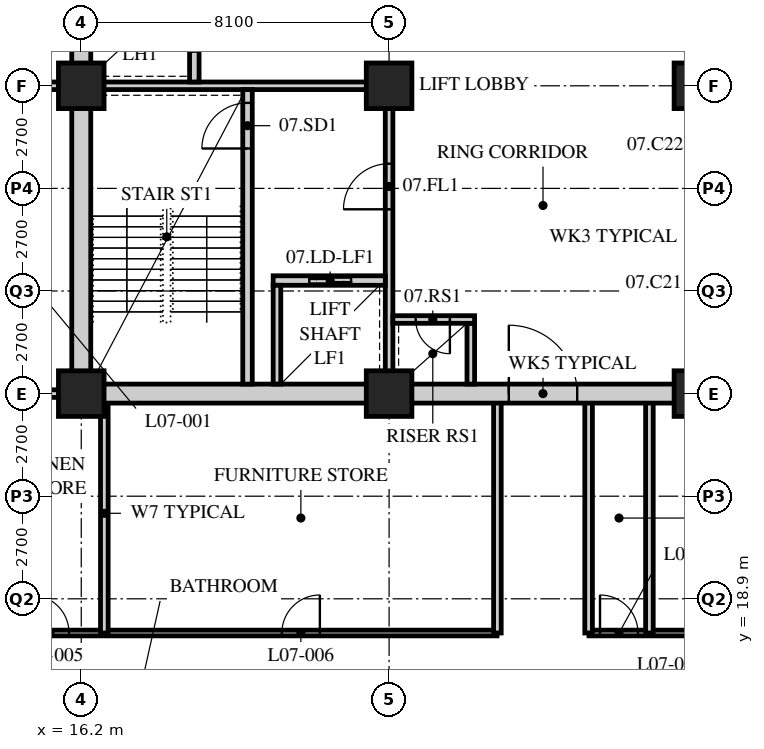
"""IFC4 building model, lengths in metres.
Left out: names, types, materials, properties, quantities, classifications, styles, units other than length and angle.
Written with IfcOpenShell. Run it as: python <this file> out.ifc"""

import sys

from ifc_helpers import new_model, si_unit, direction, frame, frame_2d, origin, origin_2d, place, context, subcontext, project, spatial, rectangle, hollow_rectangle, extrude, element, fill, save


model = new_model("IFC4")
c1 = context("Model", 3, precision=1e-05, world=origin(), true_north=direction((0.0, 1.0)))
c2 = subcontext(c1, "Body", "Model", "MODEL_VIEW")
j1 = project(units=[si_unit("LENGTHUNIT", "METRE"), si_unit("PLANEANGLEUNIT", "RADIAN")], contexts=[c1])
p1 = place(None, origin())
s1 = spatial("IfcSite", under=j1, at=p1, CompositionType="ELEMENT")
p2 = place(p1, origin())
s2 = spatial("IfcBuilding", under=s1, at=p2, CompositionType="ELEMENT")
p3 = place(p2, frame((0.0, 0.0, 36.4)))
s3 = spatial("IfcBuildingStorey", under=s2, at=p3, CompositionType="ELEMENT", Elevation=36.4)
for number, where, z_axis, x_axis in (
    (1, (16.2, 24.3, 0.0), (0.0, 0.0, 1.0), (1.0, 0.0, 0.0)),
    (2, (16.2, 32.4, 0.0), (0.0, 0.0, 1.0), (1.0, 0.0, 0.0)),
    (3, (24.3, 24.3, 0.0), (0.0, 0.0, 1.0), (1.0, 0.0, 0.0)),
    (4, (24.3, 32.4, 0.0), (0.0, 0.0, 1.0), (1.0, 0.0, 0.0)),
    (5, (32.4, 24.3, 0.0), (0.0, 0.0, 1.0), (1.0, 0.0, 0.0)),
    (6, (32.4, 32.4, 0.0), (0.0, 0.0, 1.0), (1.0, 0.0, 0.0)),
):
    element("IfcColumn", number, at=place(p3, frame(where, z_axis=z_axis, x_axis=x_axis)), inside=s3, PredefinedType="COLUMN", context=c2, shape_type="SweptSolid", body=[
        extrude(hollow_rectangle(XDim=1.2, YDim=1.2, WallThickness=0.12, at=origin_2d()), origin(), (0.0, 0.0, 1.0), 3.4),
    ])
p4 = place(p3, frame((13.95, 18.0, 0.0), z_axis=(0.0, 0.0, 1.0), x_axis=(1.0, 0.0, 0.0)))
e7 = element("IfcWall", 7, at=p4, inside=s3, PredefinedType="PARTITIONING", context=c2, shape_type="SweptSolid", body=[
    extrude(rectangle(XDim=13.19, YDim=0.15, at=frame_2d((6.595, 0.0))), origin(), (0.0, 0.0, 1.0), 3.19),
])
p5 = place(p4, frame((0.929, 0.0, 0.0)))
e8 = element("IfcOpeningElement", 8, at=p5, cuts=e7, PredefinedType="OPENING", context=c2, shape_type="SweptSolid", body=[
    extrude(rectangle(XDim=1.0, YDim=2.1, at=frame_2d((0.5, 1.05))), frame((0.0, 0.085, 0.0), z_axis=(0.0, -1.0, 0.0), x_axis=(1.0, 0.0, 0.0)), (0.0, 0.0, 1.0), 0.17),
])
p6 = place(p4, frame((7.529, 0.0, 0.0)))
e9 = element("IfcOpeningElement", 9, at=p6, cuts=e7, PredefinedType="OPENING", context=c2, shape_type="SweptSolid", body=[
    extrude(rectangle(XDim=1.0, YDim=2.1, at=frame_2d((0.5, 1.05))), frame((0.0, 0.085, 0.0), z_axis=(0.0, -1.0, 0.0), x_axis=(1.0, 0.0, 0.0)), (0.0, 0.0, 1.0), 0.17),
])
p7 = place(p3, frame((29.56, 18.0, 0.0), z_axis=(0.0, 0.0, 1.0), x_axis=(1.0, 0.0, 0.0)))
e10 = element("IfcWall", 10, at=p7, inside=s3, PredefinedType="PARTITIONING", context=c2, shape_type="SweptSolid", body=[
    extrude(rectangle(XDim=13.19, YDim=0.15, at=frame_2d((6.595, 0.0))), origin(), (0.0, 0.0, 1.0), 3.19),
])
p8 = place(p7, frame((0.29, 0.0, 0.0)))
e11 = element("IfcOpeningElement", 11, at=p8, cuts=e10, PredefinedType="OPENING", context=c2, shape_type="SweptSolid", body=[
    extrude(rectangle(XDim=1.0, YDim=2.1, at=frame_2d((0.5, 1.05))), frame((0.0, 0.085, 0.0), z_axis=(0.0, -1.0, 0.0), x_axis=(1.0, 0.0, 0.0)), (0.0, 0.0, 1.0), 0.17),
])
p9 = place(p7, frame((6.89, 0.0, 0.0)))
e12 = element("IfcOpeningElement", 12, at=p9, cuts=e10, PredefinedType="OPENING", context=c2, shape_type="SweptSolid", body=[
    extrude(rectangle(XDim=1.0, YDim=2.1, at=frame_2d((0.5, 1.05))), frame((0.0, 0.085, 0.0), z_axis=(0.0, -1.0, 0.0), x_axis=(1.0, 0.0, 0.0)), (0.0, 0.0, 1.0), 0.17),
])
p10 = place(p3, frame((13.95, 32.4, 0.0), z_axis=(0.0, 0.0, 1.0), x_axis=(1.0, 0.0, 0.0)))
e13 = element("IfcWall", 13, at=p10, inside=s3, PredefinedType="SOLIDWALL", context=c2, shape_type="SweptSolid", body=[
    extrude(rectangle(XDim=2.25, YDim=0.2, at=frame_2d((1.125, 0.0))), origin(), (0.0, 0.0, 1.0), 2.578),
])
for number, where, z_axis, x_axis in (
    (14, (16.807, 18.0, 0.0), (0.0, 0.0, 1.0), (0.0, 1.0, 0.0)),
    (15, (31.15, 18.0, 0.0), (0.0, 0.0, 1.0), (0.0, 1.0, 0.0)),
    (16, (27.15, 18.0, 0.0), (0.0, 0.0, 1.0), (0.0, 1.0, 0.0)),
    (17, (29.55, 18.0, 0.0), (0.0, 0.0, 1.0), (0.0, 1.0, 0.0)),
):
    element("IfcWall", number, at=place(p3, frame(where, z_axis=z_axis, x_axis=x_axis)), inside=s3, PredefinedType="SOLIDWALL", context=c2, shape_type="SweptSolid", body=[
        extrude(rectangle(XDim=6.3, YDim=0.2, at=frame_2d((3.15, 0.0))), origin(), (0.0, 0.0, 1.0), 3.19),
    ])
p11 = place(p3, frame((13.95, 24.3, 0.0), z_axis=(0.0, 0.0, 1.0), x_axis=(1.0, 0.0, 0.0)))
e18 = element("IfcWall", 18, at=p11, inside=s3, PredefinedType="SOLIDWALL", context=c2, shape_type="SweptSolid", body=[
    extrude(rectangle(XDim=2.25, YDim=0.2, at=frame_2d((1.125, 0.0))), origin(), (0.0, 0.0, 1.0), 2.578),
])
p12 = place(p3, frame((15.95, 24.3, 0.0), z_axis=(0.0, 0.0, 1.0), x_axis=(1.0, 0.0, 0.0)))
e19 = element("IfcWall", 19, at=p12, inside=s3, PredefinedType="SOLIDWALL", context=c2, shape_type="SweptSolid", body=[
    extrude(rectangle(XDim=24.8, YDim=0.5, at=frame_2d((12.4, 0.0))), origin(), (0.0, 0.0, 1.0), 2.54),
])
p13 = place(p12, frame((11.5, 0.0, 0.0)))
e20 = element("IfcOpeningElement", 20, at=p13, cuts=e19, PredefinedType="OPENING", context=c2, shape_type="SweptSolid", body=[
    extrude(rectangle(XDim=1.8, YDim=2.4, at=frame_2d((0.9, 1.2))), frame((0.0, 0.26, 0.0), z_axis=(0.0, -1.0, 0.0), x_axis=(1.0, 0.0, 0.0)), (0.0, 0.0, 1.0), 0.52),
])
p14 = place(p3, frame((16.2, 24.55, 0.0), z_axis=(0.0, 0.0, 1.0), x_axis=(0.0, 1.0, 0.0)))
e21 = element("IfcWall", 21, at=p14, inside=s3, PredefinedType="SOLIDWALL", context=c2, shape_type="SweptSolid", body=[
    extrude(rectangle(XDim=15.7, YDim=0.5, at=frame_2d((7.85, 0.0))), origin(), (0.0, 0.0, 1.0), 2.578),
])
p15 = place(p3, frame((16.45, 32.4, 0.0), z_axis=(0.0, 0.0, 1.0), x_axis=(1.0, 0.0, 0.0)))
e22 = element("IfcWall", 22, at=p15, inside=s3, PredefinedType="SOLIDWALL", context=c2, shape_type="SweptSolid", body=[
    extrude(rectangle(XDim=7.95, YDim=0.2, at=frame_2d((3.975, 0.0))), origin(), (0.0, 0.0, 1.0), 2.578),
])
p16 = place(p3, frame((24.3, 24.55, 0.0), z_axis=(0.0, 0.0, 1.0), x_axis=(0.0, 1.0, 0.0)))
e23 = element("IfcWall", 23, at=p16, inside=s3, PredefinedType="SOLIDWALL", context=c2, shape_type="SweptSolid", body=[
    extrude(rectangle(XDim=7.75, YDim=0.2, at=frame_2d((3.875, 0.0))), origin(), (0.0, 0.0, 1.0), 2.578),
])
p17 = place(p16, frame((4.6, 0.0, 0.0)))
e24 = element("IfcOpeningElement", 24, at=p17, cuts=e23, PredefinedType="OPENING", context=c2, shape_type="SweptSolid", body=[
    extrude(rectangle(XDim=1.2, YDim=2.1, at=frame_2d((0.6, 1.05))), frame((0.0, 0.11, 0.0), z_axis=(0.0, -1.0, 0.0), x_axis=(1.0, 0.0, 0.0)), (0.0, 0.0, 1.0), 0.22),
])
p18 = place(p3, frame((20.575, 24.55, 0.0), z_axis=(0.0, 0.0, 1.0), x_axis=(0.0, 1.0, 0.0)))
e25 = element("IfcWall", 25, at=p18, inside=s3, PredefinedType="SOLIDWALL", context=c2, shape_type="SweptSolid", body=[
    extrude(rectangle(XDim=7.75, YDim=0.25, at=frame_2d((3.875, 0.0))), origin(), (0.0, 0.0, 1.0), 3.19),
])
p19 = place(p18, frame((6.2, 0.0, 0.0)))
e26 = element("IfcOpeningElement", 26, at=p19, cuts=e25, PredefinedType="OPENING", context=c2, shape_type="SweptSolid", body=[
    extrude(rectangle(XDim=1.2, YDim=2.1, at=frame_2d((0.6, 1.05))), frame((0.0, 0.135, 0.0), z_axis=(0.0, -1.0, 0.0), x_axis=(1.0, 0.0, 0.0)), (0.0, 0.0, 1.0), 0.27),
])
p20 = place(p3, frame((21.25, 27.275, 0.0), z_axis=(0.0, 0.0, 1.0), x_axis=(1.0, 0.0, 0.0)))
e27 = element("IfcWall", 27, at=p20, inside=s3, PredefinedType="SOLIDWALL", context=c2, shape_type="SweptSolid", body=[
    extrude(rectangle(XDim=2.95, YDim=0.25, at=frame_2d((1.475, 0.0))), origin(), (0.0, 0.0, 1.0), 3.19),
])
p21 = place(p20, frame((0.95, 0.0, 0.0)))
e28 = element("IfcOpeningElement", 28, at=p21, cuts=e27, PredefinedType="OPENING", context=c2, shape_type="SweptSolid", body=[
    extrude(rectangle(XDim=1.1, YDim=2.4, at=frame_2d((0.55, 1.2))), frame((0.0, 0.135, 0.0), z_axis=(0.0, -1.0, 0.0), x_axis=(1.0, 0.0, 0.0)), (0.0, 0.0, 1.0), 0.27),
])
p22 = place(p3, frame((21.35, 24.55, 0.0), z_axis=(0.0, 0.0, 1.0), x_axis=(0.0, 1.0, 0.0)))
e29 = element("IfcWall", 29, at=p22, inside=s3, PredefinedType="SOLIDWALL", context=c2, shape_type="SweptSolid", body=[
    extrude(rectangle(XDim=2.6, YDim=0.2, at=frame_2d((1.3, 0.0))), origin(), (0.0, 0.0, 1.0), 3.19),
])
p23 = place(p3, frame((19.175, 32.5, 0.0), z_axis=(0.0, 0.0, 1.0), x_axis=(0.0, 1.0, 0.0)))
e30 = element("IfcWall", 30, at=p23, inside=s3, PredefinedType="SOLIDWALL", context=c2, shape_type="SweptSolid", body=[
    extrude(rectangle(XDim=7.75, YDim=0.25, at=frame_2d((3.875, 0.0))), origin(), (0.0, 0.0, 1.0), 3.19),
])
p24 = place(p23, frame((0.8, 0.0, 0.0)))
e31 = element("IfcOpeningElement", 31, at=p24, cuts=e30, PredefinedType="OPENING", context=c2, shape_type="SweptSolid", body=[
    extrude(rectangle(XDim=1.1, YDim=2.4, at=frame_2d((0.55, 1.2))), frame((0.0, 0.135, 0.0), z_axis=(0.0, -1.0, 0.0), x_axis=(1.0, 0.0, 0.0)), (0.0, 0.0, 1.0), 0.27),
])
p25 = place(p23, frame((3.4, 0.0, 0.0)))
e32 = element("IfcOpeningElement", 32, at=p25, cuts=e30, PredefinedType="OPENING", context=c2, shape_type="SweptSolid", body=[
    extrude(rectangle(XDim=1.1, YDim=2.4, at=frame_2d((0.55, 1.2))), frame((0.0, 0.135, 0.0), z_axis=(0.0, -1.0, 0.0), x_axis=(1.0, 0.0, 0.0)), (0.0, 0.0, 1.0), 0.27),
])
p26 = place(p23, frame((6.0, 0.0, 0.0)))
e33 = element("IfcOpeningElement", 33, at=p26, cuts=e30, PredefinedType="OPENING", context=c2, shape_type="SweptSolid", body=[
    extrude(rectangle(XDim=1.1, YDim=2.4, at=frame_2d((0.55, 1.2))), frame((0.0, 0.135, 0.0), z_axis=(0.0, -1.0, 0.0), x_axis=(1.0, 0.0, 0.0)), (0.0, 0.0, 1.0), 0.27),
])
p27 = place(p3, frame((26.45, 24.55, 0.0), z_axis=(0.0, 0.0, 1.0), x_axis=(0.0, 1.0, 0.0)))
e34 = element("IfcWall", 34, at=p27, inside=s3, PredefinedType="SOLIDWALL", context=c2, shape_type="SweptSolid", body=[
    extrude(rectangle(XDim=1.6, YDim=0.2, at=frame_2d((0.8, 0.0))), origin(), (0.0, 0.0, 1.0), 3.19),
])
p28 = place(p3, frame((24.4, 26.25, 0.0), z_axis=(0.0, 0.0, 1.0), x_axis=(1.0, 0.0, 0.0)))
e35 = element("IfcWall", 35, at=p28, inside=s3, PredefinedType="SOLIDWALL", context=c2, shape_type="SweptSolid", body=[
    extrude(rectangle(XDim=2.15, YDim=0.2, at=frame_2d((1.075, 0.0))), origin(), (0.0, 0.0, 1.0), 3.19),
])
p29 = place(p28, frame((0.6, 0.0, 0.0)))
e36 = element("IfcOpeningElement", 36, at=p29, cuts=e35, PredefinedType="OPENING", context=c2, shape_type="SweptSolid", body=[
    extrude(rectangle(XDim=0.9, YDim=2.1, at=frame_2d((0.45, 1.05))), frame((0.0, 0.11, 0.0), z_axis=(0.0, -1.0, 0.0), x_axis=(1.0, 0.0, 0.0)), (0.0, 0.0, 1.0), 0.22),
])
p30 = place(p5, origin())
e37 = element("IfcDoor", 37, at=p30, inside=s3, OperationType="SINGLE_SWING_LEFT", PredefinedType="DOOR", context=c2, shape_type="SweptSolid", body=[
    extrude(rectangle(XDim=1.0, YDim=2.1, at=frame_2d((0.5, 1.05))), frame((0.0, 0.025, 0.0), z_axis=(0.0, -1.0, 0.0), x_axis=(1.0, 0.0, 0.0)), (0.0, 0.0, 1.0), 0.05),
])
fill(e8, e37)
p31 = place(p6, origin())
e38 = element("IfcDoor", 38, at=p31, inside=s3, OperationType="SINGLE_SWING_RIGHT", PredefinedType="DOOR", context=c2, shape_type="SweptSolid", body=[
    extrude(rectangle(XDim=1.0, YDim=2.1, at=frame_2d((0.5, 1.05))), frame((0.0, 0.025, 0.0), z_axis=(0.0, -1.0, 0.0), x_axis=(1.0, 0.0, 0.0)), (0.0, 0.0, 1.0), 0.05),
])
fill(e9, e38)
p32 = place(p8, origin())
e39 = element("IfcDoor", 39, at=p32, inside=s3, OperationType="SINGLE_SWING_LEFT", PredefinedType="DOOR", context=c2, shape_type="SweptSolid", body=[
    extrude(rectangle(XDim=1.0, YDim=2.1, at=frame_2d((0.5, 1.05))), frame((0.0, 0.025, 0.0), z_axis=(0.0, -1.0, 0.0), x_axis=(1.0, 0.0, 0.0)), (0.0, 0.0, 1.0), 0.05),
])
fill(e11, e39)
p33 = place(p19, origin())
e40 = element("IfcDoor", 40, at=p33, inside=s3, OperationType="SINGLE_SWING_LEFT", PredefinedType="DOOR", context=c2, shape_type="SweptSolid", body=[
    extrude(rectangle(XDim=1.2, YDim=2.1, at=frame_2d((0.6, 1.05))), frame((0.0, 0.025, 0.0), z_axis=(0.0, -1.0, 0.0), x_axis=(1.0, 0.0, 0.0)), (0.0, 0.0, 1.0), 0.05),
])
fill(e26, e40)
p34 = place(p17, origin())
e41 = element("IfcDoor", 41, at=p34, inside=s3, OperationType="SINGLE_SWING_LEFT", PredefinedType="DOOR", context=c2, shape_type="SweptSolid", body=[
    extrude(rectangle(XDim=1.2, YDim=2.1, at=frame_2d((0.6, 1.05))), frame((0.0, 0.025, 0.0), z_axis=(0.0, -1.0, 0.0), x_axis=(1.0, 0.0, 0.0)), (0.0, 0.0, 1.0), 0.05),
])
fill(e24, e41)
p35 = place(p29, origin())
e42 = element("IfcDoor", 42, at=p35, inside=s3, OperationType="SINGLE_SWING_LEFT", PredefinedType="DOOR", context=c2, shape_type="SweptSolid", body=[
    extrude(rectangle(XDim=0.9, YDim=2.1, at=frame_2d((0.45, 1.05))), frame((0.0, 0.025, 0.0), z_axis=(0.0, -1.0, 0.0), x_axis=(1.0, 0.0, 0.0)), (0.0, 0.0, 1.0), 0.05),
])
fill(e36, e42)
p36 = place(p21, origin())
e43 = element("IfcDoor", 43, at=p36, inside=s3, OperationType="DOUBLE_DOOR_SLIDING", PredefinedType="DOOR", context=c2, shape_type="SweptSolid", body=[
    extrude(rectangle(XDim=1.1, YDim=2.4, at=frame_2d((0.55, 1.2))), frame((0.0, 0.025, 0.0), z_axis=(0.0, -1.0, 0.0), x_axis=(1.0, 0.0, 0.0)), (0.0, 0.0, 1.0), 0.05),
])
fill(e28, e43)
p37 = place(p13, origin())
e44 = element("IfcDoor", 44, at=p37, inside=s3, OperationType="DOUBLE_DOOR_SINGLE_SWING", PredefinedType="DOOR", context=c2, shape_type="SweptSolid", body=[
    extrude(rectangle(XDim=1.8, YDim=2.4, at=frame_2d((0.9, 1.2))), frame((0.0, 0.025, 0.0), z_axis=(0.0, -1.0, 0.0), x_axis=(1.0, 0.0, 0.0)), (0.0, 0.0, 1.0), 0.05),
])
fill(e20, e44)
save(model, sys.argv[1])
